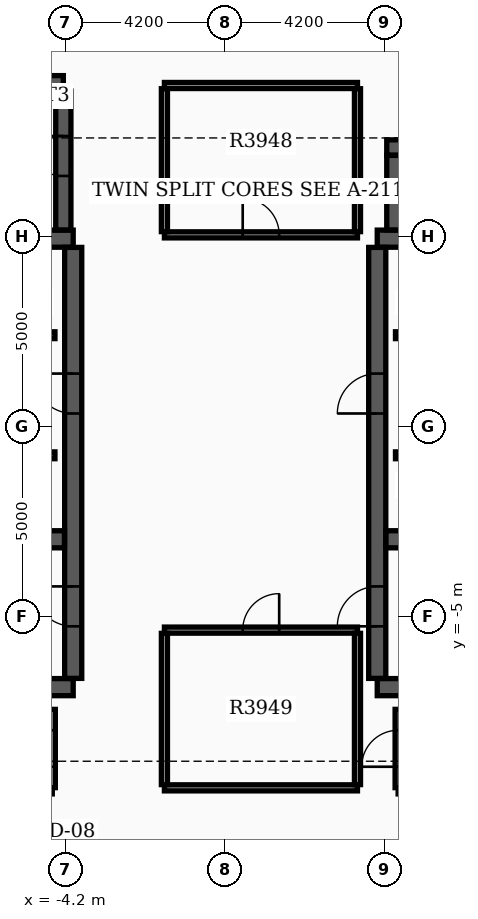
"""IFC4 building model, lengths in metres.
Left out: names, types, materials, properties, quantities, classifications, styles, units other than length and angle.
Written with IfcOpenShell. Run it as: python <this file> out.ifc"""

import sys

from ifc_helpers import new_model, si_unit, direction, frame, frame_2d, origin, place, context, subcontext, project, spatial, rectangle, extrude, element, fill, save


model = new_model("IFC4")
c1 = context("Model", 3, precision=1e-05, world=origin(), true_north=direction((0.0, 1.0)))
c2 = subcontext(c1, "Body", "Model", "MODEL_VIEW")
j1 = project(units=[si_unit("LENGTHUNIT", "METRE"), si_unit("PLANEANGLEUNIT", "RADIAN")], contexts=[c1])
p1 = place(None, origin())
s1 = spatial("IfcSite", under=j1, at=p1, CompositionType="ELEMENT")
p2 = place(p1, origin())
s2 = spatial("IfcBuilding", under=s1, at=p2, CompositionType="ELEMENT")
p3 = place(p2, frame((0.0, 0.0, 249.9)))
s3 = spatial("IfcBuildingStorey", under=s2, at=p3, CompositionType="ELEMENT", Elevation=249.9)
for number, where, z_axis, x_axis in (
    (1, (-12.4, -6.85, 0.0), (0.0, 0.0, 1.0), (1.0, 0.0, 0.0)),
    (2, (-12.4, 4.95, 0.0), (0.0, 0.0, 1.0), (1.0, 0.0, 0.0)),
):
    element("IfcWall", number, at=place(p3, frame(where, z_axis=z_axis, x_axis=x_axis)), inside=s3, PredefinedType="SHEAR", context=c2, shape_type="SweptSolid", body=[
        extrude(rectangle(XDim=8.4, YDim=0.45, at=frame_2d((4.2, 0.0))), origin(), (0.0, 0.0, 1.0), 3.7),
    ])
p4 = place(p3, frame((-4.0, -6.62, 0.0), z_axis=(0.0, 0.0, 1.0), x_axis=(0.0, 1.0, 0.0)))
e3 = element("IfcWall", 3, at=p4, inside=s3, PredefinedType="SHEAR", context=c2, shape_type="SweptSolid", body=[
    extrude(rectangle(XDim=11.34, YDim=0.45, at=frame_2d((5.67, 0.0))), origin(), (0.0, 0.0, 1.0), 3.7),
])
p5 = place(p4, frame((1.37, 0.0, 0.0)))
e4 = element("IfcOpeningElement", 4, at=p5, cuts=e3, PredefinedType="OPENING", context=c2, shape_type="SweptSolid", body=[
    extrude(rectangle(XDim=1.05, YDim=2.15, at=frame_2d((0.525, 1.075))), frame((0.0, 0.235, 0.0), z_axis=(0.0, -1.0, 0.0), x_axis=(1.0, 0.0, 0.0)), (0.0, 0.0, 1.0), 0.47),
])
p6 = place(p4, frame((6.97, 0.0, 0.0)))
e5 = element("IfcOpeningElement", 5, at=p6, cuts=e3, PredefinedType="OPENING", context=c2, shape_type="SweptSolid", body=[
    extrude(rectangle(XDim=1.05, YDim=2.15, at=frame_2d((0.525, 1.075))), frame((0.0, 0.235, 0.0), z_axis=(0.0, -1.0, 0.0), x_axis=(1.0, 0.0, 0.0)), (0.0, 0.0, 1.0), 0.47),
])
p7 = place(p3, frame((-12.17, -2.96, 0.0), z_axis=(0.0, 0.0, 1.0), x_axis=(1.0, 0.0, 0.0)))
e6 = element("IfcWall", 6, at=p7, inside=s3, PredefinedType="SHEAR", context=c2, shape_type="SweptSolid", body=[
    extrude(rectangle(XDim=7.94, YDim=0.45, at=frame_2d((3.97, 0.0))), origin(), (0.0, 0.0, 1.0), 3.7),
])
for number, where, z_axis, x_axis in (
    (7, (4.0, -6.85, 0.0), (0.0, 0.0, 1.0), (1.0, 0.0, 0.0)),
    (8, (4.0, 4.95, 0.0), (0.0, 0.0, 1.0), (1.0, 0.0, 0.0)),
):
    element("IfcWall", number, at=place(p3, frame(where, z_axis=z_axis, x_axis=x_axis)), inside=s3, PredefinedType="SHEAR", context=c2, shape_type="SweptSolid", body=[
        extrude(rectangle(XDim=8.4, YDim=0.45, at=frame_2d((4.2, 0.0))), origin(), (0.0, 0.0, 1.0), 3.7),
    ])
p8 = place(p3, frame((4.0, -6.62, 0.0), z_axis=(0.0, 0.0, 1.0), x_axis=(0.0, 1.0, 0.0)))
e9 = element("IfcWall", 9, at=p8, inside=s3, PredefinedType="SHEAR", context=c2, shape_type="SweptSolid", body=[
    extrude(rectangle(XDim=11.34, YDim=0.45, at=frame_2d((5.67, 0.0))), origin(), (0.0, 0.0, 1.0), 3.7),
])
p9 = place(p8, frame((1.37, 0.0, 0.0)))
e10 = element("IfcOpeningElement", 10, at=p9, cuts=e9, PredefinedType="OPENING", context=c2, shape_type="SweptSolid", body=[
    extrude(rectangle(XDim=1.05, YDim=2.15, at=frame_2d((0.525, 1.075))), frame((0.0, 0.235, 0.0), z_axis=(0.0, -1.0, 0.0), x_axis=(1.0, 0.0, 0.0)), (0.0, 0.0, 1.0), 0.47),
])
p10 = place(p8, frame((6.97, 0.0, 0.0)))
e11 = element("IfcOpeningElement", 11, at=p10, cuts=e9, PredefinedType="OPENING", context=c2, shape_type="SweptSolid", body=[
    extrude(rectangle(XDim=1.05, YDim=2.15, at=frame_2d((0.525, 1.075))), frame((0.0, 0.235, 0.0), z_axis=(0.0, -1.0, 0.0), x_axis=(1.0, 0.0, 0.0)), (0.0, 0.0, 1.0), 0.47),
])
p11 = place(p3, frame((4.23, -2.96, 0.0), z_axis=(0.0, 0.0, 1.0), x_axis=(1.0, 0.0, 0.0)))
e12 = element("IfcWall", 12, at=p11, inside=s3, PredefinedType="SHEAR", context=c2, shape_type="SweptSolid", body=[
    extrude(rectangle(XDim=7.94, YDim=0.45, at=frame_2d((3.97, 0.0))), origin(), (0.0, 0.0, 1.0), 3.7),
])
p12 = place(p3, frame((-12.22, 9.04, 0.0), z_axis=(0.0, 0.0, 1.0), x_axis=(1.0, 0.0, 0.0)))
e13 = element("IfcWall", 13, at=p12, inside=s3, PredefinedType="SHEAR", context=c2, shape_type="SweptSolid", body=[
    extrude(rectangle(XDim=7.96, YDim=0.4, at=frame_2d((3.98, 0.0))), origin(), (0.0, 0.0, 1.0), 3.7),
])
p13 = place(p3, frame((-4.26, 5.18, 0.0), z_axis=(0.0, 0.0, 1.0), x_axis=(0.0, 1.0, 0.0)))
e14 = element("IfcWall", 14, at=p13, inside=s3, PredefinedType="SHEAR", context=c2, shape_type="SweptSolid", body=[
    extrude(rectangle(XDim=3.655, YDim=0.4, at=frame_2d((1.828, 0.0))), origin(), (0.0, 0.0, 1.0), 3.7),
])
p14 = place(p13, frame((1.42, 0.0, 0.0)))
e15 = element("IfcOpeningElement", 15, at=p14, cuts=e14, PredefinedType="OPENING", context=c2, shape_type="SweptSolid", body=[
    extrude(rectangle(XDim=1.05, YDim=2.15, at=frame_2d((0.525, 1.075))), frame((0.0, 0.21, 0.0), z_axis=(0.0, -1.0, 0.0), x_axis=(1.0, 0.0, 0.0)), (0.0, 0.0, 1.0), 0.42),
])
p15 = place(p3, frame((4.45, 5.18, 0.0), z_axis=(0.0, 0.0, 1.0), x_axis=(0.0, 1.0, 0.0)))
e16 = element("IfcWall", 16, at=p15, inside=s3, PredefinedType="SHEAR", context=c2, shape_type="SweptSolid", body=[
    extrude(rectangle(XDim=1.96, YDim=0.4, at=frame_2d((0.98, 0.0))), origin(), (0.0, 0.0, 1.0), 3.7),
])
p16 = place(p3, frame((4.25, 7.35, 0.0), z_axis=(0.0, 0.0, 1.0), x_axis=(1.0, 0.0, 0.0)))
e17 = element("IfcWall", 17, at=p16, inside=s3, PredefinedType="SHEAR", context=c2, shape_type="SweptSolid", body=[
    extrude(rectangle(XDim=5.4, YDim=0.4, at=frame_2d((2.7, 0.0))), origin(), (0.0, 0.0, 1.0), 3.7),
])
p17 = place(p3, frame((-11.9, 2.41, 0.0), z_axis=(0.0, 0.0, 1.0), x_axis=(1.0, 0.0, 0.0)))
e18 = element("IfcWall", 18, at=p17, inside=s3, PredefinedType="SOLIDWALL", context=c2, shape_type="SweptSolid", body=[
    extrude(rectangle(XDim=7.42, YDim=0.18, at=frame_2d((3.71, 0.0))), origin(), (0.0, 0.0, 1.0), 3.17),
])
p18 = place(p17, frame((0.55, 0.0, 0.0)))
e19 = element("IfcOpeningElement", 19, at=p18, cuts=e18, PredefinedType="OPENING", context=c2, shape_type="SweptSolid", body=[
    extrude(rectangle(XDim=1.1, YDim=2.15, at=frame_2d((0.55, 1.075))), frame((0.0, 0.1, 0.0), z_axis=(0.0, -1.0, 0.0), x_axis=(1.0, 0.0, 0.0)), (0.0, 0.0, 1.0), 0.2),
])
p19 = place(p17, frame((4.9, 0.0, 0.0)))
e20 = element("IfcOpeningElement", 20, at=p19, cuts=e18, PredefinedType="OPENING", context=c2, shape_type="SweptSolid", body=[
    extrude(rectangle(XDim=0.88, YDim=2.1, at=frame_2d((0.44, 1.05))), frame((0.0, 0.1, 0.0), z_axis=(0.0, -1.0, 0.0), x_axis=(1.0, 0.0, 0.0)), (0.0, 0.0, 1.0), 0.2),
])
p20 = place(p3, frame((4.48, 2.41, 0.0), z_axis=(0.0, 0.0, 1.0), x_axis=(1.0, 0.0, 0.0)))
e21 = element("IfcWall", 21, at=p20, inside=s3, PredefinedType="SOLIDWALL", context=c2, shape_type="SweptSolid", body=[
    extrude(rectangle(XDim=7.42, YDim=0.18, at=frame_2d((3.71, 0.0))), origin(), (0.0, 0.0, 1.0), 3.17),
])
p21 = place(p20, frame((5.67, 0.0, 0.0)))
e22 = element("IfcOpeningElement", 22, at=p21, cuts=e21, PredefinedType="OPENING", context=c2, shape_type="SweptSolid", body=[
    extrude(rectangle(XDim=1.1, YDim=2.15, at=frame_2d((0.55, 1.075))), frame((0.0, 0.1, 0.0), z_axis=(0.0, -1.0, 0.0), x_axis=(1.0, 0.0, 0.0)), (0.0, 0.0, 1.0), 0.2),
])
p22 = place(p20, frame((1.6, 0.0, 0.0)))
e23 = element("IfcOpeningElement", 23, at=p22, cuts=e21, PredefinedType="OPENING", context=c2, shape_type="SweptSolid", body=[
    extrude(rectangle(XDim=0.88, YDim=2.1, at=frame_2d((0.44, 1.05))), frame((0.0, 0.1, 0.0), z_axis=(0.0, -1.0, 0.0), x_axis=(1.0, 0.0, 0.0)), (0.0, 0.0, 1.0), 0.2),
])
p23 = place(p3, frame((-11.9, -0.75, 0.0), z_axis=(0.0, 0.0, 1.0), x_axis=(1.0, 0.0, 0.0)))
e24 = element("IfcWall", 24, at=p23, inside=s3, PredefinedType="SOLIDWALL", context=c2, shape_type="SweptSolid", body=[
    extrude(rectangle(XDim=7.42, YDim=0.18, at=frame_2d((3.71, 0.0))), origin(), (0.0, 0.0, 1.0), 3.17),
])
p24 = place(p23, frame((5.75, 0.0, 0.0)))
e25 = element("IfcOpeningElement", 25, at=p24, cuts=e24, PredefinedType="OPENING", context=c2, shape_type="SweptSolid", body=[
    extrude(rectangle(XDim=1.1, YDim=2.15, at=frame_2d((0.55, 1.075))), frame((0.0, 0.1, 0.0), z_axis=(0.0, -1.0, 0.0), x_axis=(1.0, 0.0, 0.0)), (0.0, 0.0, 1.0), 0.2),
])
p25 = place(p23, frame((1.6, 0.0, 0.0)))
e26 = element("IfcOpeningElement", 26, at=p25, cuts=e24, PredefinedType="OPENING", context=c2, shape_type="SweptSolid", body=[
    extrude(rectangle(XDim=0.88, YDim=2.1, at=frame_2d((0.44, 1.05))), frame((0.0, 0.1, 0.0), z_axis=(0.0, -1.0, 0.0), x_axis=(1.0, 0.0, 0.0)), (0.0, 0.0, 1.0), 0.2),
])
p26 = place(p3, frame((4.48, -0.75, 0.0), z_axis=(0.0, 0.0, 1.0), x_axis=(1.0, 0.0, 0.0)))
e27 = element("IfcWall", 27, at=p26, inside=s3, PredefinedType="SOLIDWALL", context=c2, shape_type="SweptSolid", body=[
    extrude(rectangle(XDim=7.42, YDim=0.18, at=frame_2d((3.71, 0.0))), origin(), (0.0, 0.0, 1.0), 3.17),
])
p27 = place(p26, frame((3.92, 0.0, 0.0)))
e28 = element("IfcOpeningElement", 28, at=p27, cuts=e27, PredefinedType="OPENING", context=c2, shape_type="SweptSolid", body=[
    extrude(rectangle(XDim=1.1, YDim=2.15, at=frame_2d((0.55, 1.075))), frame((0.0, 0.1, 0.0), z_axis=(0.0, -1.0, 0.0), x_axis=(1.0, 0.0, 0.0)), (0.0, 0.0, 1.0), 0.2),
])
p28 = place(p26, frame((5.82, 0.0, 0.0)))
e29 = element("IfcOpeningElement", 29, at=p28, cuts=e27, PredefinedType="OPENING", context=c2, shape_type="SweptSolid", body=[
    extrude(rectangle(XDim=1.1, YDim=2.15, at=frame_2d((0.55, 1.075))), frame((0.0, 0.1, 0.0), z_axis=(0.0, -1.0, 0.0), x_axis=(1.0, 0.0, 0.0)), (0.0, 0.0, 1.0), 0.2),
])
p29 = place(p26, frame((1.6, 0.0, 0.0)))
e30 = element("IfcOpeningElement", 30, at=p29, cuts=e27, PredefinedType="OPENING", context=c2, shape_type="SweptSolid", body=[
    extrude(rectangle(XDim=0.88, YDim=2.1, at=frame_2d((0.44, 1.05))), frame((0.0, 0.1, 0.0), z_axis=(0.0, -1.0, 0.0), x_axis=(1.0, 0.0, 0.0)), (0.0, 0.0, 1.0), 0.2),
])
p30 = place(p3, frame((-1.6, 5.05, 0.0), z_axis=(0.0, 0.0, 1.0), x_axis=(1.0, 0.0, 0.0)))
e31 = element("IfcWall", 31, at=p30, inside=s3, PredefinedType="PARTITIONING", context=c2, shape_type="SweptSolid", body=[
    extrude(rectangle(XDim=5.08, YDim=0.16, at=frame_2d((2.54, 0.0))), origin(), (0.0, 0.0, 1.0), 3.17),
])
p31 = place(p30, frame((2.06, 0.0, 0.0)))
e32 = element("IfcOpeningElement", 32, at=p31, cuts=e31, PredefinedType="OPENING", context=c2, shape_type="SweptSolid", body=[
    extrude(rectangle(XDim=0.96, YDim=2.15, at=frame_2d((0.48, 1.075))), frame((0.0, 0.09, 0.0), z_axis=(0.0, -1.0, 0.0), x_axis=(1.0, 0.0, 0.0)), (0.0, 0.0, 1.0), 0.18),
])
p32 = place(p3, frame((-1.6, 8.98, 0.0), z_axis=(0.0, 0.0, 1.0), x_axis=(1.0, 0.0, 0.0)))
e33 = element("IfcWall", 33, at=p32, inside=s3, PredefinedType="PARTITIONING", context=c2, shape_type="SweptSolid", body=[
    extrude(rectangle(XDim=5.08, YDim=0.16, at=frame_2d((2.54, 0.0))), origin(), (0.0, 0.0, 1.0), 3.17),
])
for number, where, z_axis, x_axis in (
    (34, (-1.6, 5.135, 0.0), (0.0, 0.0, 1.0), (0.0, 1.0, 0.0)),
    (35, (3.48, 5.135, 0.0), (0.0, 0.0, 1.0), (0.0, 1.0, 0.0)),
):
    element("IfcWall", number, at=place(p3, frame(where, z_axis=z_axis, x_axis=x_axis)), inside=s3, PredefinedType="PARTITIONING", context=c2, shape_type="SweptSolid", body=[
        extrude(rectangle(XDim=3.76, YDim=0.16, at=frame_2d((1.88, 0.0))), origin(), (0.0, 0.0, 1.0), 3.17),
    ])
p33 = place(p3, frame((-1.6, -9.5, 0.0), z_axis=(0.0, 0.0, 1.0), x_axis=(1.0, 0.0, 0.0)))
e36 = element("IfcWall", 36, at=p33, inside=s3, PredefinedType="PARTITIONING", context=c2, shape_type="SweptSolid", body=[
    extrude(rectangle(XDim=5.08, YDim=0.16, at=frame_2d((2.54, 0.0))), origin(), (0.0, 0.0, 1.0), 3.17),
])
p34 = place(p3, frame((-1.6, -5.35, 0.0), z_axis=(0.0, 0.0, 1.0), x_axis=(1.0, 0.0, 0.0)))
e37 = element("IfcWall", 37, at=p34, inside=s3, PredefinedType="PARTITIONING", context=c2, shape_type="SweptSolid", body=[
    extrude(rectangle(XDim=5.08, YDim=0.16, at=frame_2d((2.54, 0.0))), origin(), (0.0, 0.0, 1.0), 3.17),
])
p35 = place(p34, frame((2.06, 0.0, 0.0)))
e38 = element("IfcOpeningElement", 38, at=p35, cuts=e37, PredefinedType="OPENING", context=c2, shape_type="SweptSolid", body=[
    extrude(rectangle(XDim=0.96, YDim=2.15, at=frame_2d((0.48, 1.075))), frame((0.0, 0.09, 0.0), z_axis=(0.0, -1.0, 0.0), x_axis=(1.0, 0.0, 0.0)), (0.0, 0.0, 1.0), 0.18),
])
for number, where, z_axis, x_axis in (
    (39, (-1.6, -9.415, 0.0), (0.0, 0.0, 1.0), (0.0, 1.0, 0.0)),
    (40, (3.48, -9.415, 0.0), (0.0, 0.0, 1.0), (0.0, 1.0, 0.0)),
):
    element("IfcWall", number, at=place(p3, frame(where, z_axis=z_axis, x_axis=x_axis)), inside=s3, PredefinedType="PARTITIONING", context=c2, shape_type="SweptSolid", body=[
        extrude(rectangle(XDim=3.98, YDim=0.16, at=frame_2d((1.99, 0.0))), origin(), (0.0, 0.0, 1.0), 3.17),
    ])
p36 = place(p3, frame((4.55, -9.58, 0.0), z_axis=(0.0, 0.0, 1.0), x_axis=(1.0, 0.0, 0.0)))
e41 = element("IfcWall", 41, at=p36, inside=s3, PredefinedType="PARTITIONING", context=c2, shape_type="SweptSolid", body=[
    extrude(rectangle(XDim=8.1, YDim=0.16, at=frame_2d((4.05, 0.0))), origin(), (0.0, 0.0, 1.0), 3.17),
])
p37 = place(p3, frame((4.55, -9.495, 0.0), z_axis=(0.0, 0.0, 1.0), x_axis=(0.0, 1.0, 0.0)))
e42 = element("IfcWall", 42, at=p37, inside=s3, PredefinedType="PARTITIONING", context=c2, shape_type="SweptSolid", body=[
    extrude(rectangle(XDim=2.06, YDim=0.16, at=frame_2d((1.03, 0.0))), origin(), (0.0, 0.0, 1.0), 3.17),
])
p38 = place(p37, frame((0.55, 0.0, 0.0)))
e43 = element("IfcOpeningElement", 43, at=p38, cuts=e42, PredefinedType="OPENING", context=c2, shape_type="SweptSolid", body=[
    extrude(rectangle(XDim=0.96, YDim=2.15, at=frame_2d((0.48, 1.075))), frame((0.0, 0.09, 0.0), z_axis=(0.0, -1.0, 0.0), x_axis=(1.0, 0.0, 0.0)), (0.0, 0.0, 1.0), 0.18),
])
p39 = place(p3, frame((-4.55, -9.495, 0.0), z_axis=(0.0, 0.0, 1.0), x_axis=(0.0, 1.0, 0.0)))
e44 = element("IfcWall", 44, at=p39, inside=s3, PredefinedType="PARTITIONING", context=c2, shape_type="SweptSolid", body=[
    extrude(rectangle(XDim=2.06, YDim=0.16, at=frame_2d((1.03, 0.0))), origin(), (0.0, 0.0, 1.0), 3.17),
])
p40 = place(p39, frame((0.55, 0.0, 0.0)))
e45 = element("IfcOpeningElement", 45, at=p40, cuts=e44, PredefinedType="OPENING", context=c2, shape_type="SweptSolid", body=[
    extrude(rectangle(XDim=0.96, YDim=2.15, at=frame_2d((0.48, 1.075))), frame((0.0, 0.09, 0.0), z_axis=(0.0, -1.0, 0.0), x_axis=(1.0, 0.0, 0.0)), (0.0, 0.0, 1.0), 0.18),
])
p41 = place(p5, origin())
e46 = element("IfcDoor", 46, at=p41, inside=s3, OperationType="SINGLE_SWING_RIGHT", PredefinedType="DOOR", context=c2, shape_type="SweptSolid", body=[
    extrude(rectangle(XDim=1.05, YDim=2.15, at=frame_2d((0.525, 1.075))), frame((0.0, 0.025, 0.0), z_axis=(0.0, -1.0, 0.0), x_axis=(1.0, 0.0, 0.0)), (0.0, 0.0, 1.0), 0.05),
])
fill(e4, e46)
p42 = place(p9, origin())
e47 = element("IfcDoor", 47, at=p42, inside=s3, OperationType="SINGLE_SWING_LEFT", PredefinedType="DOOR", context=c2, shape_type="SweptSolid", body=[
    extrude(rectangle(XDim=1.05, YDim=2.15, at=frame_2d((0.525, 1.075))), frame((0.0, 0.025, 0.0), z_axis=(0.0, -1.0, 0.0), x_axis=(1.0, 0.0, 0.0)), (0.0, 0.0, 1.0), 0.05),
])
fill(e10, e47)
p43 = place(p6, origin())
e48 = element("IfcDoor", 48, at=p43, inside=s3, OperationType="SINGLE_SWING_RIGHT", PredefinedType="DOOR", context=c2, shape_type="SweptSolid", body=[
    extrude(rectangle(XDim=1.05, YDim=2.15, at=frame_2d((0.525, 1.075))), frame((0.0, 0.025, 0.0), z_axis=(0.0, -1.0, 0.0), x_axis=(1.0, 0.0, 0.0)), (0.0, 0.0, 1.0), 0.05),
])
fill(e5, e48)
p44 = place(p10, origin())
e49 = element("IfcDoor", 49, at=p44, inside=s3, OperationType="SINGLE_SWING_LEFT", PredefinedType="DOOR", context=c2, shape_type="SweptSolid", body=[
    extrude(rectangle(XDim=1.05, YDim=2.15, at=frame_2d((0.525, 1.075))), frame((0.0, 0.025, 0.0), z_axis=(0.0, -1.0, 0.0), x_axis=(1.0, 0.0, 0.0)), (0.0, 0.0, 1.0), 0.05),
])
fill(e11, e49)
p45 = place(p14, origin())
e50 = element("IfcDoor", 50, at=p45, inside=s3, OperationType="SINGLE_SWING_RIGHT", PredefinedType="DOOR", context=c2, shape_type="SweptSolid", body=[
    extrude(rectangle(XDim=1.05, YDim=2.15, at=frame_2d((0.525, 1.075))), frame((0.0, 0.025, 0.0), z_axis=(0.0, -1.0, 0.0), x_axis=(1.0, 0.0, 0.0)), (0.0, 0.0, 1.0), 0.05),
])
fill(e15, e50)
p46 = place(p31, origin())
e51 = element("IfcDoor", 51, at=p46, inside=s3, OperationType="SINGLE_SWING_LEFT", PredefinedType="DOOR", context=c2, shape_type="SweptSolid", body=[
    extrude(rectangle(XDim=0.96, YDim=2.15, at=frame_2d((0.48, 1.075))), frame((0.0, 0.025, 0.0), z_axis=(0.0, -1.0, 0.0), x_axis=(1.0, 0.0, 0.0)), (0.0, 0.0, 1.0), 0.05),
])
fill(e32, e51)
p47 = place(p35, origin())
e52 = element("IfcDoor", 52, at=p47, inside=s3, OperationType="SINGLE_SWING_RIGHT", PredefinedType="DOOR", context=c2, shape_type="SweptSolid", body=[
    extrude(rectangle(XDim=0.96, YDim=2.15, at=frame_2d((0.48, 1.075))), frame((0.0, 0.025, 0.0), z_axis=(0.0, -1.0, 0.0), x_axis=(1.0, 0.0, 0.0)), (0.0, 0.0, 1.0), 0.05),
])
fill(e38, e52)
p48 = place(p38, origin())
e53 = element("IfcDoor", 53, at=p48, inside=s3, OperationType="SINGLE_SWING_LEFT", PredefinedType="DOOR", context=c2, shape_type="SweptSolid", body=[
    extrude(rectangle(XDim=0.96, YDim=2.15, at=frame_2d((0.48, 1.075))), frame((0.0, 0.025, 0.0), z_axis=(0.0, -1.0, 0.0), x_axis=(1.0, 0.0, 0.0)), (0.0, 0.0, 1.0), 0.05),
])
fill(e43, e53)
p49 = place(p40, origin())
e54 = element("IfcDoor", 54, at=p49, inside=s3, OperationType="SINGLE_SWING_RIGHT", PredefinedType="DOOR", context=c2, shape_type="SweptSolid", body=[
    extrude(rectangle(XDim=0.96, YDim=2.15, at=frame_2d((0.48, 1.075))), frame((0.0, 0.025, 0.0), z_axis=(0.0, -1.0, 0.0), x_axis=(1.0, 0.0, 0.0)), (0.0, 0.0, 1.0), 0.05),
])
fill(e45, e54)
save(model, sys.argv[1])
